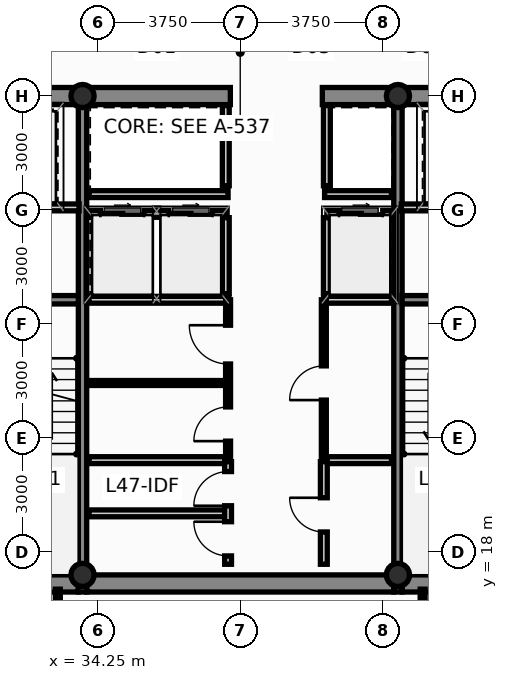
"""IFC4 building model, lengths in metres.
Left out: names, types, materials, properties, quantities, classifications, styles, units other than length and angle.
Written with IfcOpenShell. Run it as: python <this file> out.ifc"""

import sys

from ifc_helpers import new_model, si_unit, direction, frame, frame_2d, origin, origin_2d, place, context, subcontext, project, spatial, rectangle, hollow_circle, extrude, source, transform, mapped, element, fill, save


model = new_model("IFC4")
c1 = context("Model", 3, precision=1e-05, world=origin(), true_north=direction((0.0, 1.0)))
c2 = subcontext(c1, "Body", "Model", "MODEL_VIEW")
j1 = project(units=[si_unit("LENGTHUNIT", "METRE"), si_unit("PLANEANGLEUNIT", "RADIAN")], contexts=[c1])
p1 = place(None, origin())
s1 = spatial("IfcSite", under=j1, at=p1, CompositionType="ELEMENT")
p2 = place(p1, origin())
s2 = spatial("IfcBuilding", under=s1, at=p2, CompositionType="ELEMENT")
p3 = place(p2, frame((0.0, 0.0, 180.4)))
s3 = spatial("IfcBuildingStorey", under=s2, at=p3, CompositionType="ELEMENT", Elevation=180.4)
m1 = source(origin(), c2, "Body", "SweptSolid", [
    extrude(hollow_circle(Radius=0.305, WallThickness=0.025, at=origin_2d()), origin(), (0.0, 0.0, 1.0), 3.65),
])
for number, where, z_axis, x_axis in (
    (1, (33.85, 17.4, 0.0), (0.0, 0.0, 1.0), (1.0, 0.0, 0.0)),
    (2, (42.15, 17.4, 0.0), (0.0, 0.0, 1.0), (1.0, 0.0, 0.0)),
    (3, (33.85, 30.0, 0.0), (0.0, 0.0, 1.0), (1.0, 0.0, 0.0)),
    (4, (42.15, 30.0, 0.0), (0.0, 0.0, 1.0), (1.0, 0.0, 0.0)),
):
    element("IfcColumn", number, at=place(p3, frame(where, z_axis=z_axis, x_axis=x_axis)), inside=s3, PredefinedType="COLUMN", context=c2, shape_type="MappedRepresentation", body=[
        mapped(m1, transform((0.0, 0.0, 0.0), scale=1.0)),
    ])
p4 = place(p3, frame((30.84, 17.175, 0.0), z_axis=(0.0, 0.0, 1.0), x_axis=(1.0, 0.0, 0.0)))
e5 = element("IfcWall", 5, at=p4, inside=s3, PredefinedType="SHEAR", context=c2, shape_type="SweptSolid", body=[
    extrude(rectangle(XDim=2.9, YDim=0.45, at=frame_2d((1.45, 0.0))), origin(), (0.0, 0.0, 1.0), 3.65),
])
p5 = place(p3, frame((33.96, 17.175, 0.0), z_axis=(0.0, 0.0, 1.0), x_axis=(1.0, 0.0, 0.0)))
e6 = element("IfcWall", 6, at=p5, inside=s3, PredefinedType="SHEAR", context=c2, shape_type="SweptSolid", body=[
    extrude(rectangle(XDim=8.08, YDim=0.45, at=frame_2d((4.04, 0.0))), origin(), (0.0, 0.0, 1.0), 3.65),
])
for number, where, z_axis, x_axis in (
    (7, (42.26, 17.175, 0.0), (0.0, 0.0, 1.0), (1.0, 0.0, 0.0)),
    (8, (30.84, 30.0, 0.0), (0.0, 0.0, 1.0), (1.0, 0.0, 0.0)),
):
    element("IfcWall", number, at=place(p3, frame(where, z_axis=z_axis, x_axis=x_axis)), inside=s3, PredefinedType="SHEAR", context=c2, shape_type="SweptSolid", body=[
        extrude(rectangle(XDim=2.9, YDim=0.45, at=frame_2d((1.45, 0.0))), origin(), (0.0, 0.0, 1.0), 3.65),
    ])
p6 = place(p3, frame((33.96, 30.0, 0.0), z_axis=(0.0, 0.0, 1.0), x_axis=(1.0, 0.0, 0.0)))
e9 = element("IfcWall", 9, at=p6, inside=s3, PredefinedType="SHEAR", context=c2, shape_type="SweptSolid", body=[
    extrude(rectangle(XDim=3.78, YDim=0.45, at=frame_2d((1.89, 0.0))), origin(), (0.0, 0.0, 1.0), 3.65),
])
p7 = place(p3, frame((40.16, 30.0, 0.0), z_axis=(0.0, 0.0, 1.0), x_axis=(1.0, 0.0, 0.0)))
e10 = element("IfcWall", 10, at=p7, inside=s3, PredefinedType="SHEAR", context=c2, shape_type="SweptSolid", body=[
    extrude(rectangle(XDim=1.88, YDim=0.45, at=frame_2d((0.94, 0.0))), origin(), (0.0, 0.0, 1.0), 3.65),
])
p8 = place(p3, frame((42.26, 30.0, 0.0), z_axis=(0.0, 0.0, 1.0), x_axis=(1.0, 0.0, 0.0)))
e11 = element("IfcWall", 11, at=p8, inside=s3, PredefinedType="SHEAR", context=c2, shape_type="SweptSolid", body=[
    extrude(rectangle(XDim=2.9, YDim=0.45, at=frame_2d((1.45, 0.0))), origin(), (0.0, 0.0, 1.0), 3.65),
])
for number, where, z_axis, x_axis in (
    (12, (33.85, 16.95, 0.0), (0.0, 0.0, 1.0), (0.0, 1.0, 0.0)),
    (13, (42.15, 16.95, 0.0), (0.0, 0.0, 1.0), (0.0, 1.0, 0.0)),
):
    element("IfcWall", number, at=place(p3, frame(where, z_axis=z_axis, x_axis=x_axis)), inside=s3, PredefinedType="SHEAR", context=c2, shape_type="SweptSolid", body=[
        extrude(rectangle(XDim=13.275, YDim=0.22, at=frame_2d((6.638, 0.0))), origin(), (0.0, 0.0, 1.0), 3.65),
    ])
for number, where, z_axis, x_axis in (
    (14, (30.84, 24.64, 0.0), (0.0, 0.0, 1.0), (1.0, 0.0, 0.0)),
    (15, (42.26, 24.64, 0.0), (0.0, 0.0, 1.0), (1.0, 0.0, 0.0)),
):
    element("IfcWall", number, at=place(p3, frame(where, z_axis=z_axis, x_axis=x_axis)), inside=s3, PredefinedType="SHEAR", context=c2, shape_type="SweptSolid", body=[
        extrude(rectangle(XDim=2.9, YDim=0.22, at=frame_2d((1.45, 0.0))), origin(), (0.0, 0.0, 1.0), 3.65),
    ])
p9 = place(p3, frame((34.02, 26.9, 0.0), z_axis=(0.0, 0.0, 1.0), x_axis=(1.0, 0.0, 0.0)))
e16 = element("IfcWall", 16, at=p9, inside=s3, PredefinedType="PARTITIONING", context=c2, shape_type="SweptSolid", body=[
    extrude(rectangle(XDim=3.6, YDim=0.18, at=frame_2d((1.8, 0.0))), origin(), (0.0, 0.0, 1.0), 3.4),
])
p10 = place(p9, frame((0.3, 0.0, 0.0)))
e17 = element("IfcOpeningElement", 17, at=p10, cuts=e16, PredefinedType="OPENING", context=c2, shape_type="SweptSolid", body=[
    extrude(rectangle(XDim=1.15, YDim=2.2, at=frame_2d((0.575, 1.1))), frame((0.0, 0.102, 0.0), z_axis=(0.0, -1.0, 0.0), x_axis=(1.0, 0.0, 0.0)), (0.0, 0.0, 1.0), 0.204),
])
p11 = place(p9, frame((2.1, 0.0, 0.0)))
e18 = element("IfcOpeningElement", 18, at=p11, cuts=e16, PredefinedType="OPENING", context=c2, shape_type="SweptSolid", body=[
    extrude(rectangle(XDim=1.15, YDim=2.2, at=frame_2d((0.575, 1.1))), frame((0.0, 0.102, 0.0), z_axis=(0.0, -1.0, 0.0), x_axis=(1.0, 0.0, 0.0)), (0.0, 0.0, 1.0), 0.204),
])
p12 = place(p3, frame((40.28, 26.9, 0.0), z_axis=(0.0, 0.0, 1.0), x_axis=(1.0, 0.0, 0.0)))
e19 = element("IfcWall", 19, at=p12, inside=s3, PredefinedType="PARTITIONING", context=c2, shape_type="SweptSolid", body=[
    extrude(rectangle(XDim=1.7, YDim=0.18, at=frame_2d((0.85, 0.0))), origin(), (0.0, 0.0, 1.0), 3.4),
])
p13 = place(p12, frame((0.32, 0.0, 0.0)))
e20 = element("IfcOpeningElement", 20, at=p13, cuts=e19, PredefinedType="OPENING", context=c2, shape_type="SweptSolid", body=[
    extrude(rectangle(XDim=1.15, YDim=2.2, at=frame_2d((0.575, 1.1))), frame((0.0, 0.102, 0.0), z_axis=(0.0, -1.0, 0.0), x_axis=(1.0, 0.0, 0.0)), (0.0, 0.0, 1.0), 0.204),
])
for number, where, z_axis, x_axis in (
    (21, (37.62, 24.8, 0.0), (0.0, 0.0, 1.0), (0.0, 1.0, 0.0)),
    (22, (40.28, 24.8, 0.0), (0.0, 0.0, 1.0), (0.0, 1.0, 0.0)),
):
    element("IfcWall", number, at=place(p3, frame(where, z_axis=z_axis, x_axis=x_axis)), inside=s3, PredefinedType="PARTITIONING", context=c2, shape_type="SweptSolid", body=[
        extrude(rectangle(XDim=2.0, YDim=0.18, at=frame_2d((1.0, 0.0))), origin(), (0.0, 0.0, 1.0), 3.4),
    ])
p14 = place(p3, frame((34.02, 24.64, 0.0), z_axis=(0.0, 0.0, 1.0), x_axis=(1.0, 0.0, 0.0)))
e23 = element("IfcWall", 23, at=p14, inside=s3, PredefinedType="PARTITIONING", context=c2, shape_type="SweptSolid", body=[
    extrude(rectangle(XDim=3.68, YDim=0.18, at=frame_2d((1.84, 0.0))), origin(), (0.0, 0.0, 1.0), 3.4),
])
p15 = place(p3, frame((40.2, 24.64, 0.0), z_axis=(0.0, 0.0, 1.0), x_axis=(1.0, 0.0, 0.0)))
e24 = element("IfcWall", 24, at=p15, inside=s3, PredefinedType="PARTITIONING", context=c2, shape_type="SweptSolid", body=[
    extrude(rectangle(XDim=1.78, YDim=0.18, at=frame_2d((0.89, 0.0))), origin(), (0.0, 0.0, 1.0), 3.4),
])
p16 = place(p3, frame((34.02, 27.42, 0.0), z_axis=(0.0, 0.0, 1.0), x_axis=(1.0, 0.0, 0.0)))
e25 = element("IfcWall", 25, at=p16, inside=s3, PredefinedType="PARTITIONING", context=c2, shape_type="SweptSolid", body=[
    extrude(rectangle(XDim=3.66, YDim=0.18, at=frame_2d((1.83, 0.0))), origin(), (0.0, 0.0, 1.0), 3.4),
])
p17 = place(p3, frame((40.22, 27.42, 0.0), z_axis=(0.0, 0.0, 1.0), x_axis=(1.0, 0.0, 0.0)))
e26 = element("IfcWall", 26, at=p17, inside=s3, PredefinedType="PARTITIONING", context=c2, shape_type="SweptSolid", body=[
    extrude(rectangle(XDim=1.76, YDim=0.18, at=frame_2d((0.88, 0.0))), origin(), (0.0, 0.0, 1.0), 3.4),
])
for number, where, z_axis, x_axis in (
    (27, (37.62, 27.64, 0.0), (0.0, 0.0, 1.0), (0.0, 1.0, 0.0)),
    (28, (40.28, 27.64, 0.0), (0.0, 0.0, 1.0), (0.0, 1.0, 0.0)),
):
    element("IfcWall", number, at=place(p3, frame(where, z_axis=z_axis, x_axis=x_axis)), inside=s3, PredefinedType="PARTITIONING", context=c2, shape_type="SweptSolid", body=[
        extrude(rectangle(XDim=2.11, YDim=0.18, at=frame_2d((1.055, 0.0))), origin(), (0.0, 0.0, 1.0), 3.4),
    ])
for number, where, z_axis, x_axis in (
    (29, (30.86, 27.07, 0.0), (0.0, 0.0, 1.0), (1.0, 0.0, 0.0)),
    (30, (42.24, 27.07, 0.0), (0.0, 0.0, 1.0), (1.0, 0.0, 0.0)),
):
    element("IfcWall", number, at=place(p3, frame(where, z_axis=z_axis, x_axis=x_axis)), inside=s3, PredefinedType="PARTITIONING", context=c2, shape_type="SweptSolid", body=[
        extrude(rectangle(XDim=2.9, YDim=0.18, at=frame_2d((1.45, 0.0))), origin(), (0.0, 0.0, 1.0), 3.4),
    ])
p18 = place(p3, frame((34.02, 20.42, 0.0), z_axis=(0.0, 0.0, 1.0), x_axis=(1.0, 0.0, 0.0)))
e31 = element("IfcWall", 31, at=p18, inside=s3, PredefinedType="PARTITIONING", context=c2, shape_type="SweptSolid", body=[
    extrude(rectangle(XDim=3.64, YDim=0.18, at=frame_2d((1.82, 0.0))), origin(), (0.0, 0.0, 1.0), 3.4),
])
p19 = place(p3, frame((40.22, 20.42, 0.0), z_axis=(0.0, 0.0, 1.0), x_axis=(1.0, 0.0, 0.0)))
e32 = element("IfcWall", 32, at=p19, inside=s3, PredefinedType="PARTITIONING", context=c2, shape_type="SweptSolid", body=[
    extrude(rectangle(XDim=1.76, YDim=0.18, at=frame_2d((0.88, 0.0))), origin(), (0.0, 0.0, 1.0), 3.4),
])
p20 = place(p3, frame((34.02, 22.45, 0.0), z_axis=(0.0, 0.0, 1.0), x_axis=(1.0, 0.0, 0.0)))
e33 = element("IfcWall", 33, at=p20, inside=s3, PredefinedType="PARTITIONING", context=c2, shape_type="SweptSolid", body=[
    extrude(rectangle(XDim=3.58, YDim=0.13, at=frame_2d((1.79, 0.0))), origin(), (0.0, 0.0, 1.0), 3.4),
])
p21 = place(p3, frame((37.68, 20.5, 0.0), z_axis=(0.0, 0.0, 1.0), x_axis=(0.0, 1.0, 0.0)))
e34 = element("IfcWall", 34, at=p21, inside=s3, PredefinedType="PARTITIONING", context=c2, shape_type="SweptSolid", body=[
    extrude(rectangle(XDim=4.14, YDim=0.13, at=frame_2d((2.07, 0.0))), origin(), (0.0, 0.0, 1.0), 3.4),
])
p22 = place(p21, frame((0.42, 0.0, 0.0)))
e35 = element("IfcOpeningElement", 35, at=p22, cuts=e34, PredefinedType="OPENING", context=c2, shape_type="SweptSolid", body=[
    extrude(rectangle(XDim=0.9, YDim=2.1, at=frame_2d((0.45, 1.05))), frame((0.0, 0.077, 0.0), z_axis=(0.0, -1.0, 0.0), x_axis=(1.0, 0.0, 0.0)), (0.0, 0.0, 1.0), 0.154),
])
p23 = place(p21, frame((2.45, 0.0, 0.0)))
e36 = element("IfcOpeningElement", 36, at=p23, cuts=e34, PredefinedType="OPENING", context=c2, shape_type="SweptSolid", body=[
    extrude(rectangle(XDim=1.02, YDim=2.15, at=frame_2d((0.51, 1.075))), frame((0.0, 0.077, 0.0), z_axis=(0.0, -1.0, 0.0), x_axis=(1.0, 0.0, 0.0)), (0.0, 0.0, 1.0), 0.154),
])
p24 = place(p3, frame((40.2, 20.5, 0.0), z_axis=(0.0, 0.0, 1.0), x_axis=(0.0, 1.0, 0.0)))
e37 = element("IfcWall", 37, at=p24, inside=s3, PredefinedType="PARTITIONING", context=c2, shape_type="SweptSolid", body=[
    extrude(rectangle(XDim=4.14, YDim=0.13, at=frame_2d((2.07, 0.0))), origin(), (0.0, 0.0, 1.0), 3.4),
])
p25 = place(p24, frame((1.5, 0.0, 0.0)))
e38 = element("IfcOpeningElement", 38, at=p25, cuts=e37, PredefinedType="OPENING", context=c2, shape_type="SweptSolid", body=[
    extrude(rectangle(XDim=0.9, YDim=2.1, at=frame_2d((0.45, 1.05))), frame((0.0, 0.077, 0.0), z_axis=(0.0, -1.0, 0.0), x_axis=(1.0, 0.0, 0.0)), (0.0, 0.0, 1.0), 0.154),
])
p26 = place(p3, frame((34.02, 19.02, 0.0), z_axis=(0.0, 0.0, 1.0), x_axis=(1.0, 0.0, 0.0)))
e39 = element("IfcWall", 39, at=p26, inside=s3, PredefinedType="PARTITIONING", context=c2, shape_type="SweptSolid", body=[
    extrude(rectangle(XDim=3.58, YDim=0.18, at=frame_2d((1.79, 0.0))), origin(), (0.0, 0.0, 1.0), 3.4),
])
p27 = place(p3, frame((37.68, 17.68, 0.0), z_axis=(0.0, 0.0, 1.0), x_axis=(0.0, 1.0, 0.0)))
e40 = element("IfcWall", 40, at=p27, inside=s3, PredefinedType="PARTITIONING", context=c2, shape_type="SweptSolid", body=[
    extrude(rectangle(XDim=2.7, YDim=0.18, at=frame_2d((1.35, 0.0))), origin(), (0.0, 0.0, 1.0), 3.4),
])
p28 = place(p27, frame((0.22, 0.0, 0.0)))
e41 = element("IfcOpeningElement", 41, at=p28, cuts=e40, PredefinedType="OPENING", context=c2, shape_type="SweptSolid", body=[
    extrude(rectangle(XDim=0.9, YDim=2.1, at=frame_2d((0.45, 1.05))), frame((0.0, 0.102, 0.0), z_axis=(0.0, -1.0, 0.0), x_axis=(1.0, 0.0, 0.0)), (0.0, 0.0, 1.0), 0.204),
])
p29 = place(p27, frame((1.54, 0.0, 0.0)))
e42 = element("IfcOpeningElement", 42, at=p29, cuts=e40, PredefinedType="OPENING", context=c2, shape_type="SweptSolid", body=[
    extrude(rectangle(XDim=0.9, YDim=2.1, at=frame_2d((0.45, 1.05))), frame((0.0, 0.102, 0.0), z_axis=(0.0, -1.0, 0.0), x_axis=(1.0, 0.0, 0.0)), (0.0, 0.0, 1.0), 0.204),
])
p30 = place(p3, frame((40.2, 17.68, 0.0), z_axis=(0.0, 0.0, 1.0), x_axis=(0.0, 1.0, 0.0)))
e43 = element("IfcWall", 43, at=p30, inside=s3, PredefinedType="PARTITIONING", context=c2, shape_type="SweptSolid", body=[
    extrude(rectangle(XDim=2.7, YDim=0.18, at=frame_2d((1.35, 0.0))), origin(), (0.0, 0.0, 1.0), 3.4),
])
p31 = place(p30, frame((0.85, 0.0, 0.0)))
e44 = element("IfcOpeningElement", 44, at=p31, cuts=e43, PredefinedType="OPENING", context=c2, shape_type="SweptSolid", body=[
    extrude(rectangle(XDim=0.9, YDim=2.1, at=frame_2d((0.45, 1.05))), frame((0.0, 0.102, 0.0), z_axis=(0.0, -1.0, 0.0), x_axis=(1.0, 0.0, 0.0)), (0.0, 0.0, 1.0), 0.204),
])
for number, where, z_axis, x_axis in (
    (45, (33.2, 16.205, 0.0), (0.0, 0.0, 1.0), (0.0, 1.0, 0.0)),
    (46, (42.8, 16.205, 0.0), (0.0, 0.0, 1.0), (0.0, 1.0, 0.0)),
):
    element("IfcWall", number, at=place(p3, frame(where, z_axis=z_axis, x_axis=x_axis)), inside=s3, PredefinedType="PARTITIONING", context=c2, shape_type="SweptSolid", body=[
        extrude(rectangle(XDim=0.82, YDim=0.13, at=frame_2d((0.41, 0.0))), origin(), (0.0, 0.0, 1.0), 3.4),
    ])
p32 = place(p10, origin())
e47 = element("IfcDoor", 47, at=p32, inside=s3, OperationType="SLIDING_TO_LEFT", PredefinedType="DOOR", context=c2, shape_type="SweptSolid", body=[
    extrude(rectangle(XDim=1.15, YDim=2.2, at=frame_2d((0.575, 1.1))), frame((0.0, 0.025, 0.0), z_axis=(0.0, -1.0, 0.0), x_axis=(1.0, 0.0, 0.0)), (0.0, 0.0, 1.0), 0.05),
])
fill(e17, e47)
p33 = place(p11, origin())
e48 = element("IfcDoor", 48, at=p33, inside=s3, OperationType="SLIDING_TO_RIGHT", PredefinedType="DOOR", context=c2, shape_type="SweptSolid", body=[
    extrude(rectangle(XDim=1.15, YDim=2.2, at=frame_2d((0.575, 1.1))), frame((0.0, 0.025, 0.0), z_axis=(0.0, -1.0, 0.0), x_axis=(1.0, 0.0, 0.0)), (0.0, 0.0, 1.0), 0.05),
])
fill(e18, e48)
p34 = place(p13, origin())
e49 = element("IfcDoor", 49, at=p34, inside=s3, OperationType="SLIDING_TO_LEFT", PredefinedType="DOOR", context=c2, shape_type="SweptSolid", body=[
    extrude(rectangle(XDim=1.15, YDim=2.2, at=frame_2d((0.575, 1.1))), frame((0.0, 0.025, 0.0), z_axis=(0.0, -1.0, 0.0), x_axis=(1.0, 0.0, 0.0)), (0.0, 0.0, 1.0), 0.05),
])
fill(e20, e49)
p35 = place(p22, origin())
e50 = element("IfcDoor", 50, at=p35, inside=s3, OperationType="SINGLE_SWING_LEFT", PredefinedType="DOOR", context=c2, shape_type="SweptSolid", body=[
    extrude(rectangle(XDim=0.9, YDim=2.1, at=frame_2d((0.45, 1.05))), frame((0.0, 0.025, 0.0), z_axis=(0.0, -1.0, 0.0), x_axis=(1.0, 0.0, 0.0)), (0.0, 0.0, 1.0), 0.05),
])
fill(e35, e50)
p36 = place(p23, origin())
e51 = element("IfcDoor", 51, at=p36, inside=s3, OperationType="SINGLE_SWING_RIGHT", PredefinedType="DOOR", context=c2, shape_type="SweptSolid", body=[
    extrude(rectangle(XDim=1.02, YDim=2.15, at=frame_2d((0.51, 1.075))), frame((0.0, 0.025, 0.0), z_axis=(0.0, -1.0, 0.0), x_axis=(1.0, 0.0, 0.0)), (0.0, 0.0, 1.0), 0.05),
])
fill(e36, e51)
p37 = place(p25, origin())
e52 = element("IfcDoor", 52, at=p37, inside=s3, OperationType="SINGLE_SWING_LEFT", PredefinedType="DOOR", context=c2, shape_type="SweptSolid", body=[
    extrude(rectangle(XDim=0.9, YDim=2.1, at=frame_2d((0.45, 1.05))), frame((0.0, 0.025, 0.0), z_axis=(0.0, -1.0, 0.0), x_axis=(1.0, 0.0, 0.0)), (0.0, 0.0, 1.0), 0.05),
])
fill(e38, e52)
p38 = place(p28, origin())
e53 = element("IfcDoor", 53, at=p38, inside=s3, OperationType="SINGLE_SWING_RIGHT", PredefinedType="DOOR", context=c2, shape_type="SweptSolid", body=[
    extrude(rectangle(XDim=0.9, YDim=2.1, at=frame_2d((0.45, 1.05))), frame((0.0, 0.025, 0.0), z_axis=(0.0, -1.0, 0.0), x_axis=(1.0, 0.0, 0.0)), (0.0, 0.0, 1.0), 0.05),
])
fill(e41, e53)
p39 = place(p29, origin())
e54 = element("IfcDoor", 54, at=p39, inside=s3, OperationType="SINGLE_SWING_LEFT", PredefinedType="DOOR", context=c2, shape_type="SweptSolid", body=[
    extrude(rectangle(XDim=0.9, YDim=2.1, at=frame_2d((0.45, 1.05))), frame((0.0, 0.025, 0.0), z_axis=(0.0, -1.0, 0.0), x_axis=(1.0, 0.0, 0.0)), (0.0, 0.0, 1.0), 0.05),
])
fill(e42, e54)
p40 = place(p31, origin())
e55 = element("IfcDoor", 55, at=p40, inside=s3, OperationType="SINGLE_SWING_RIGHT", PredefinedType="DOOR", context=c2, shape_type="SweptSolid", body=[
    extrude(rectangle(XDim=0.9, YDim=2.1, at=frame_2d((0.45, 1.05))), frame((0.0, 0.025, 0.0), z_axis=(0.0, -1.0, 0.0), x_axis=(1.0, 0.0, 0.0)), (0.0, 0.0, 1.0), 0.05),
])
fill(e44, e55)
save(model, sys.argv[1])
